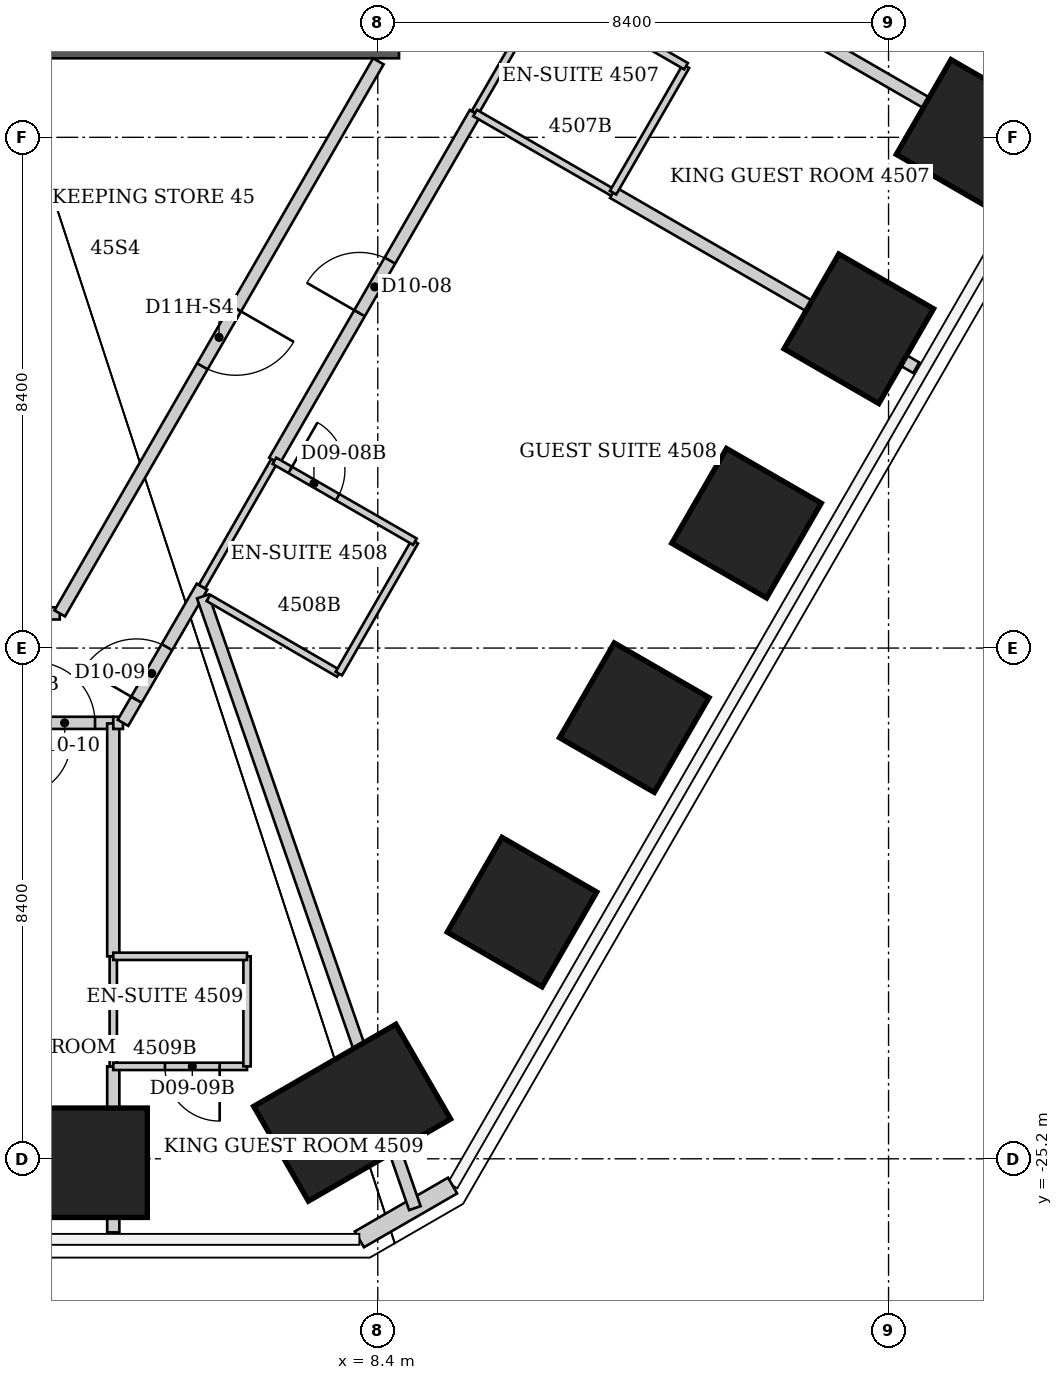
"""IFC4 building model, lengths in metres.
Left out: names, types, materials, properties, quantities, classifications, styles, units other than length and angle.
Written with IfcOpenShell. Run it as: python <this file> out.ifc"""

import sys

from ifc_helpers import new_model, si_unit, direction, frame, frame_2d, origin, origin_2d, place, context, subcontext, project, spatial, rectangle, extrude, element, fill, save


model = new_model("IFC4")
c1 = context("Model", 3, precision=1e-05, world=origin(), true_north=direction((0.0, 1.0)))
c2 = subcontext(c1, "Body", "Model", "MODEL_VIEW")
j1 = project(units=[si_unit("LENGTHUNIT", "METRE"), si_unit("PLANEANGLEUNIT", "RADIAN")], contexts=[c1])
p1 = place(None, origin())
s1 = spatial("IfcSite", under=j1, at=p1, CompositionType="ELEMENT")
p2 = place(p1, origin())
s2 = spatial("IfcBuilding", under=s1, at=p2, CompositionType="ELEMENT")
p3 = place(p2, frame((0.0, 0.0, 183.2)))
s3 = spatial("IfcBuildingStorey", under=s2, at=p3, CompositionType="ELEMENT", Elevation=183.2)
for number, where, z_axis, x_axis in (
    (1, (18.157, -8.351, 0.0), (0.0, 0.0, 1.0), (0.866, -0.5, 0.0)),
    (2, (16.311, -11.549, 0.0), (0.0, 0.0, 1.0), (0.866, -0.5, 0.0)),
    (3, (14.465, -14.747, 0.0), (0.0, 0.0, 1.0), (0.866, -0.5, 0.0)),
    (4, (12.618, -17.945, 0.0), (0.0, 0.0, 1.0), (0.866, -0.5, 0.0)),
    (5, (10.772, -21.142, 0.0), (0.0, 0.0, 1.0), (0.866, -0.5, 0.0)),
):
    element("IfcColumn", number, at=place(p3, frame(where, z_axis=z_axis, x_axis=x_axis)), inside=s3, PredefinedType="COLUMN", context=c2, shape_type="SweptSolid", body=[
        extrude(rectangle(XDim=1.8, YDim=1.8, at=origin_2d()), origin(), (0.0, 0.0, 1.0), 3.8),
    ])
p4 = place(p3, frame((7.979, -24.442, 0.0), z_axis=(0.0, 0.0, 1.0), x_axis=(0.5, -0.866025403784, 0.0)))
e6 = element("IfcColumn", 6, at=p4, inside=s3, PredefinedType="COLUMN", context=c2, shape_type="SweptSolid", body=[
    extrude(rectangle(XDim=1.8, YDim=2.7, at=origin_2d()), origin(), (0.0, 0.0, 1.0), 3.8),
])
p5 = place(p3, frame((3.71, -25.265, 0.0), z_axis=(0.0, 0.0, 1.0), x_axis=(0.0, -1.0, 0.0)))
e7 = element("IfcColumn", 7, at=p5, inside=s3, PredefinedType="COLUMN", context=c2, shape_type="SweptSolid", body=[
    extrude(rectangle(XDim=1.8, YDim=1.8, at=origin_2d()), origin(), (0.0, 0.0, 1.0), 3.8),
])
p6 = place(p3, frame((-8.75, -6.6, 0.0), z_axis=(0.0, 0.0, 1.0), x_axis=(1.0, 0.0, 0.0)))
e8 = element("IfcWall", 8, at=p6, inside=s3, PredefinedType="SHEAR", context=c2, shape_type="SweptSolid", body=[
    extrude(rectangle(XDim=17.5, YDim=1.0, at=frame_2d((8.75, 0.0))), origin(), (0.0, 0.0, 1.0), 3.8),
])
p7 = place(p3, frame((9.63, -25.64, 0.0), z_axis=(0.0, 0.0, 1.0), x_axis=(-0.866036293601, -0.499981137809, 0.0)))
e9 = element("IfcWall", 9, at=p7, inside=s3, PredefinedType="SOLIDWALL", context=c2, shape_type="SweptSolid", body=[
    extrude(rectangle(XDim=1.77, YDim=0.3, at=frame_2d((0.885, 0.0))), origin(), (0.0, 0.0, 1.0), 3.64),
])
p8 = place(p3, frame((2.45, -18.03, 0.0), z_axis=(0.0, 0.0, 1.0), x_axis=(1.0, 0.0, 0.0)))
e10 = element("IfcWall", 10, at=p8, inside=s3, PredefinedType="PARTITIONING", context=c2, shape_type="SweptSolid", body=[
    extrude(rectangle(XDim=1.6, YDim=0.2, at=frame_2d((0.8, 0.0))), origin(), (0.0, 0.0, 1.0), 3.64),
])
p9 = place(p8, frame((0.3, 0.0, 0.0)))
e11 = element("IfcOpeningElement", 11, at=p9, cuts=e10, PredefinedType="OPENING", context=c2, shape_type="SweptSolid", body=[
    extrude(rectangle(XDim=1.0, YDim=2.13, at=frame_2d((0.5, 1.065))), frame((0.0, 0.1, 0.0), z_axis=(0.0, -1.0, 0.0), x_axis=(1.0, 0.0, 0.0)), (0.0, 0.0, 1.0), 0.2),
])
p10 = place(p3, frame((3.17, -16.23, 0.0), z_axis=(0.0, 0.0, 1.0), x_axis=(-1.0, 0.0, 0.0)))
e12 = element("IfcWall", 12, at=p10, inside=s3, PredefinedType="PARTITIONING", context=c2, shape_type="SweptSolid", body=[
    extrude(rectangle(XDim=1.57, YDim=0.2, at=frame_2d((0.785, 0.0))), origin(), (0.0, 0.0, 1.0), 3.64),
])
p11 = place(p3, frame((4.05, -26.41, 0.0), z_axis=(0.0, 0.0, 1.0), x_axis=(0.0, 1.0, 0.0)))
e13 = element("IfcWall", 13, at=p11, inside=s3, PredefinedType="PARTITIONING", context=c2, shape_type="SweptSolid", body=[
    extrude(rectangle(XDim=2.73, YDim=0.2, at=frame_2d((1.365, 0.0))), origin(), (0.0, 0.0, 1.0), 3.64),
])
p12 = place(p3, frame((4.05, -23.68, 0.0), z_axis=(0.0, 0.0, 1.0), x_axis=(0.0, 1.0, 0.0)))
e14 = element("IfcWall", 14, at=p12, inside=s3, PredefinedType="PARTITIONING", context=c2, shape_type="SweptSolid", body=[
    extrude(rectangle(XDim=1.81, YDim=0.12, at=frame_2d((0.905, 0.0))), origin(), (0.0, 0.0, 1.0), 3.64),
])
p13 = place(p3, frame((4.05, -23.68, 0.0), z_axis=(0.0, 0.0, 1.0), x_axis=(1.0, 0.0, 0.0)))
e15 = element("IfcWall", 15, at=p13, inside=s3, PredefinedType="PARTITIONING", context=c2, shape_type="SweptSolid", body=[
    extrude(rectangle(XDim=2.2, YDim=0.12, at=frame_2d((1.1, 0.0))), origin(), (0.0, 0.0, 1.0), 3.64),
])
p14 = place(p13, frame((0.85, 0.0, 0.0)))
e16 = element("IfcOpeningElement", 16, at=p14, cuts=e15, PredefinedType="OPENING", context=c2, shape_type="SweptSolid", body=[
    extrude(rectangle(XDim=0.9, YDim=2.03, at=frame_2d((0.45, 1.015))), frame((0.0, 0.06, 0.0), z_axis=(0.0, -1.0, 0.0), x_axis=(1.0, 0.0, 0.0)), (0.0, 0.0, 1.0), 0.12),
])
p15 = place(p3, frame((4.05, -21.87, 0.0), z_axis=(0.0, 0.0, 1.0), x_axis=(0.0, 1.0, 0.0)))
e17 = element("IfcWall", 17, at=p15, inside=s3, PredefinedType="PARTITIONING", context=c2, shape_type="SweptSolid", body=[
    extrude(rectangle(XDim=3.83, YDim=0.2, at=frame_2d((1.915, 0.0))), origin(), (0.0, 0.0, 1.0), 3.64),
])
p16 = place(p3, frame((4.05, -18.03, 0.0), z_axis=(0.0, 0.0, 1.0), x_axis=(1.0, 0.0, 0.0)))
e18 = element("IfcWall", 18, at=p16, inside=s3, PredefinedType="PARTITIONING", context=c2, shape_type="SweptSolid", body=[
    extrude(rectangle(XDim=0.16, YDim=0.2, at=frame_2d((0.08, 0.0))), origin(), (0.0, 0.0, 1.0), 3.64),
])
p17 = place(p3, frame((5.51, -15.79, 0.0), z_axis=(0.0, 0.0, 1.0), x_axis=(-0.501964949025, -0.864887963814, 0.0)))
e19 = element("IfcWall", 19, at=p17, inside=s3, PredefinedType="PARTITIONING", context=c2, shape_type="SweptSolid", body=[
    extrude(rectangle(XDim=2.59, YDim=0.2, at=frame_2d((1.295, 0.0))), origin(), (0.0, 0.0, 1.0), 3.64),
])
p18 = place(p17, frame((1.15, 0.0, 0.0)))
e20 = element("IfcOpeningElement", 20, at=p18, cuts=e19, PredefinedType="OPENING", context=c2, shape_type="SweptSolid", body=[
    extrude(rectangle(XDim=1.0, YDim=2.13, at=frame_2d((0.5, 1.065))), frame((0.0, 0.1, 0.0), z_axis=(0.0, -1.0, 0.0), x_axis=(1.0, 0.0, 0.0)), (0.0, 0.0, 1.0), 0.2),
])
p19 = place(p3, frame((5.51, -15.79, 0.0), z_axis=(0.0, 0.0, 1.0), x_axis=(0.49836161924, 0.866969259241, 0.0)))
e21 = element("IfcWall", 21, at=p19, inside=s3, PredefinedType="PARTITIONING", context=c2, shape_type="SweptSolid", body=[
    extrude(rectangle(XDim=2.388, YDim=0.12, at=frame_2d((1.194, 0.0))), origin(), (0.0, 0.0, 1.0), 3.64),
])
p20 = place(p3, frame((5.522, -15.951, 0.0), z_axis=(0.0, 0.0, 1.0), x_axis=(0.327588517074, -0.944820492729, 0.0)))
e22 = element("IfcWall", 22, at=p20, inside=s3, PredefinedType="PARTITIONING", context=c2, shape_type="SweptSolid", body=[
    extrude(rectangle(XDim=10.648, YDim=0.2, at=frame_2d((5.324, 0.0))), origin(), (0.0, 0.0, 1.0), 3.64),
])
p21 = place(p3, frame((5.615, -15.975, 0.0), z_axis=(0.0, 0.0, 1.0), x_axis=(0.864873056518, -0.501990633487, 0.0)))
e23 = element("IfcWall", 23, at=p21, inside=s3, PredefinedType="PARTITIONING", context=c2, shape_type="SweptSolid", body=[
    extrude(rectangle(XDim=2.48, YDim=0.12, at=frame_2d((1.24, 0.0))), origin(), (0.0, 0.0, 1.0), 3.038),
])
p22 = place(p3, frame((6.25, -23.68, 0.0), z_axis=(0.0, 0.0, 1.0), x_axis=(0.0, 1.0, 0.0)))
e24 = element("IfcWall", 24, at=p22, inside=s3, PredefinedType="PARTITIONING", context=c2, shape_type="SweptSolid", body=[
    extrude(rectangle(XDim=1.81, YDim=0.12, at=frame_2d((0.905, 0.0))), origin(), (0.0, 0.0, 1.0), 3.64),
])
p23 = place(p3, frame((6.25, -21.87, 0.0), z_axis=(0.0, 0.0, 1.0), x_axis=(-1.0, 0.0, 0.0)))
e25 = element("IfcWall", 25, at=p23, inside=s3, PredefinedType="PARTITIONING", context=c2, shape_type="SweptSolid", body=[
    extrude(rectangle(XDim=2.2, YDim=0.12, at=frame_2d((1.1, 0.0))), origin(), (0.0, 0.0, 1.0), 3.64),
])
p24 = place(p3, frame((6.7, -13.72, 0.0), z_axis=(0.0, 0.0, 1.0), x_axis=(0.499729921425, 0.866181277581, 0.0)))
e26 = element("IfcWall", 26, at=p24, inside=s3, PredefinedType="PARTITIONING", context=c2, shape_type="SweptSolid", body=[
    extrude(rectangle(XDim=6.604, YDim=0.2, at=frame_2d((3.302, 0.0))), origin(), (0.0, 0.0, 1.0), 3.64),
])
p25 = place(p24, frame((2.802, 0.0, 0.0)))
e27 = element("IfcOpeningElement", 27, at=p25, cuts=e26, PredefinedType="OPENING", context=c2, shape_type="SweptSolid", body=[
    extrude(rectangle(XDim=1.0, YDim=2.13, at=frame_2d((0.5, 1.065))), frame((0.0, 0.1, 0.0), z_axis=(0.0, -1.0, 0.0), x_axis=(1.0, 0.0, 0.0)), (0.0, 0.0, 1.0), 0.2),
])
p26 = place(p3, frame((7.76, -17.22, 0.0), z_axis=(0.0, 0.0, 1.0), x_axis=(0.499159685399, 0.866510016372, 0.0)))
e28 = element("IfcWall", 28, at=p26, inside=s3, PredefinedType="PARTITIONING", context=c2, shape_type="SweptSolid", body=[
    extrude(rectangle(XDim=2.504, YDim=0.12, at=frame_2d((1.252, 0.0))), origin(), (0.0, 0.0, 1.0), 3.64),
])
p27 = place(p3, frame((8.41, -7.15, 0.0), z_axis=(0.0, 0.0, 1.0), x_axis=(-0.499828628176, -0.866124322748, 0.0)))
e29 = element("IfcWall", 29, at=p27, inside=s3, PredefinedType="PARTITIONING", context=c2, shape_type="SweptSolid", body=[
    extrude(rectangle(XDim=10.484, YDim=0.2, at=frame_2d((5.242, 0.0))), origin(), (0.0, 0.0, 1.0), 3.64),
])
p28 = place(p27, frame((4.692, 0.0, 0.0)))
e30 = element("IfcOpeningElement", 30, at=p28, cuts=e29, PredefinedType="OPENING", context=c2, shape_type="SweptSolid", body=[
    extrude(rectangle(XDim=1.1, YDim=2.2, at=frame_2d((0.55, 1.1))), frame((0.0, 0.1, 0.0), z_axis=(0.0, -1.0, 0.0), x_axis=(1.0, 0.0, 0.0)), (0.0, 0.0, 1.0), 0.2),
])
p29 = place(p3, frame((9.01, -15.05, 0.0), z_axis=(0.0, 0.0, 1.0), x_axis=(-0.866615255992, 0.498976951453, 0.0)))
e31 = element("IfcWall", 31, at=p29, inside=s3, PredefinedType="PARTITIONING", context=c2, shape_type="SweptSolid", body=[
    extrude(rectangle(XDim=2.666, YDim=0.12, at=frame_2d((1.333, 0.0))), origin(), (0.0, 0.0, 1.0), 3.64),
])
p30 = place(p29, frame((1.466, 0.0, 0.0)))
e32 = element("IfcOpeningElement", 32, at=p30, cuts=e31, PredefinedType="OPENING", context=c2, shape_type="SweptSolid", body=[
    extrude(rectangle(XDim=0.9, YDim=2.03, at=frame_2d((0.45, 1.015))), frame((0.0, 0.06, 0.0), z_axis=(0.0, -1.0, 0.0), x_axis=(1.0, 0.0, 0.0)), (0.0, 0.0, 1.0), 0.12),
])
p31 = place(p3, frame((9.996, -7.998, 0.0), z_axis=(0.0, 0.0, 1.0), x_axis=(0.501188543314, 0.865338109672, 0.0)))
e33 = element("IfcWall", 33, at=p31, inside=s3, PredefinedType="PARTITIONING", context=c2, shape_type="SweptSolid", body=[
    extrude(rectangle(XDim=2.402, YDim=0.12, at=frame_2d((1.201, 0.0))), origin(), (0.0, 0.0, 1.0), 3.64),
])
p32 = place(p3, frame((10.0, -8.0, 0.0), z_axis=(0.0, 0.0, 1.0), x_axis=(0.866010296064, -0.500026166427, 0.0)))
e34 = element("IfcWall", 34, at=p32, inside=s3, PredefinedType="PARTITIONING", context=c2, shape_type="SweptSolid", body=[
    extrude(rectangle(XDim=2.621, YDim=0.12, at=frame_2d((1.311, 0.0))), origin(), (0.0, 0.0, 1.0), 3.038),
])
p33 = place(p3, frame((12.27, -9.311, 0.0), z_axis=(0.0, 0.0, 1.0), x_axis=(0.865985044037, -0.500069898618, 0.0)))
e35 = element("IfcWall", 35, at=p33, inside=s3, PredefinedType="PARTITIONING", context=c2, shape_type="SweptSolid", body=[
    extrude(rectangle(XDim=5.758, YDim=0.2, at=frame_2d((2.879, 0.0))), origin(), (0.0, 0.0, 1.0), 3.038),
])
p34 = place(p3, frame((12.27, -9.31, 0.0), z_axis=(0.0, 0.0, 1.0), x_axis=(0.499693115345, 0.866202511239, 0.0)))
e36 = element("IfcWall", 36, at=p34, inside=s3, PredefinedType="PARTITIONING", context=c2, shape_type="SweptSolid", body=[
    extrude(rectangle(XDim=2.401, YDim=0.12, at=frame_2d((1.201, 0.0))), origin(), (0.0, 0.0, 1.0), 3.64),
])
p35 = place(p3, frame((13.47, -7.23, 0.0), z_axis=(0.0, 0.0, 1.0), x_axis=(-0.866114241029, 0.499846097802, 0.0)))
e37 = element("IfcWall", 37, at=p35, inside=s3, PredefinedType="PARTITIONING", context=c2, shape_type="SweptSolid", body=[
    extrude(rectangle(XDim=2.621, YDim=0.12, at=frame_2d((1.311, 0.0))), origin(), (0.0, 0.0, 1.0), 3.64),
])
p36 = place(p35, frame((1.421, 0.0, 0.0)))
e38 = element("IfcOpeningElement", 38, at=p36, cuts=e37, PredefinedType="OPENING", context=c2, shape_type="SweptSolid", body=[
    extrude(rectangle(XDim=0.9, YDim=2.03, at=frame_2d((0.45, 1.015))), frame((0.0, 0.06, 0.0), z_axis=(0.0, -1.0, 0.0), x_axis=(1.0, 0.0, 0.0)), (0.0, 0.0, 1.0), 0.12),
])
p37 = place(p3, frame((14.2, -5.971, 0.0), z_axis=(0.0, 0.0, 1.0), x_axis=(0.86600340545, -0.500038100297, 0.0)))
e39 = element("IfcWall", 39, at=p37, inside=s3, PredefinedType="PARTITIONING", context=c2, shape_type="SweptSolid", body=[
    extrude(rectangle(XDim=5.758, YDim=0.2, at=frame_2d((2.879, 0.0))), origin(), (0.0, 0.0, 1.0), 3.038),
])
p38 = place(p25, origin())
e40 = element("IfcDoor", 40, at=p38, inside=s3, OperationType="SINGLE_SWING_LEFT", PredefinedType="DOOR", context=c2, shape_type="SweptSolid", body=[
    extrude(rectangle(XDim=1.0, YDim=2.13, at=frame_2d((0.5, 1.065))), frame((0.0, 0.025, 0.0), z_axis=(0.0, -1.0, 0.0), x_axis=(1.0, 0.0, 0.0)), (0.0, 0.0, 1.0), 0.05),
])
fill(e27, e40)
p39 = place(p30, origin())
e41 = element("IfcDoor", 41, at=p39, inside=s3, OperationType="SINGLE_SWING_RIGHT", PredefinedType="DOOR", context=c2, shape_type="SweptSolid", body=[
    extrude(rectangle(XDim=0.9, YDim=2.03, at=frame_2d((0.45, 1.015))), frame((0.0, 0.025, 0.0), z_axis=(0.0, -1.0, 0.0), x_axis=(1.0, 0.0, 0.0)), (0.0, 0.0, 1.0), 0.05),
])
fill(e32, e41)
p40 = place(p18, origin())
e42 = element("IfcDoor", 42, at=p40, inside=s3, OperationType="SINGLE_SWING_RIGHT", PredefinedType="DOOR", context=c2, shape_type="SweptSolid", body=[
    extrude(rectangle(XDim=1.0, YDim=2.13, at=frame_2d((0.5, 1.065))), frame((0.0, 0.025, 0.0), z_axis=(0.0, -1.0, 0.0), x_axis=(1.0, 0.0, 0.0)), (0.0, 0.0, 1.0), 0.05),
])
fill(e20, e42)
p41 = place(p14, origin())
e43 = element("IfcDoor", 43, at=p41, inside=s3, OperationType="SINGLE_SWING_RIGHT", PredefinedType="DOOR", context=c2, shape_type="SweptSolid", body=[
    extrude(rectangle(XDim=0.9, YDim=2.03, at=frame_2d((0.45, 1.015))), frame((0.0, 0.025, 0.0), z_axis=(0.0, -1.0, 0.0), x_axis=(1.0, 0.0, 0.0)), (0.0, 0.0, 1.0), 0.05),
])
fill(e16, e43)
p42 = place(p9, origin())
e44 = element("IfcDoor", 44, at=p42, inside=s3, OperationType="SINGLE_SWING_LEFT", PredefinedType="DOOR", context=c2, shape_type="SweptSolid", body=[
    extrude(rectangle(XDim=1.0, YDim=2.13, at=frame_2d((0.5, 1.065))), frame((0.0, 0.025, 0.0), z_axis=(0.0, -1.0, 0.0), x_axis=(1.0, 0.0, 0.0)), (0.0, 0.0, 1.0), 0.05),
])
fill(e11, e44)
p43 = place(p28, origin())
e45 = element("IfcDoor", 45, at=p43, inside=s3, OperationType="SINGLE_SWING_LEFT", PredefinedType="DOOR", context=c2, shape_type="SweptSolid", body=[
    extrude(rectangle(XDim=1.1, YDim=2.2, at=frame_2d((0.55, 1.1))), frame((0.0, 0.025, 0.0), z_axis=(0.0, -1.0, 0.0), x_axis=(1.0, 0.0, 0.0)), (0.0, 0.0, 1.0), 0.05),
])
fill(e30, e45)
save(model, sys.argv[1])
